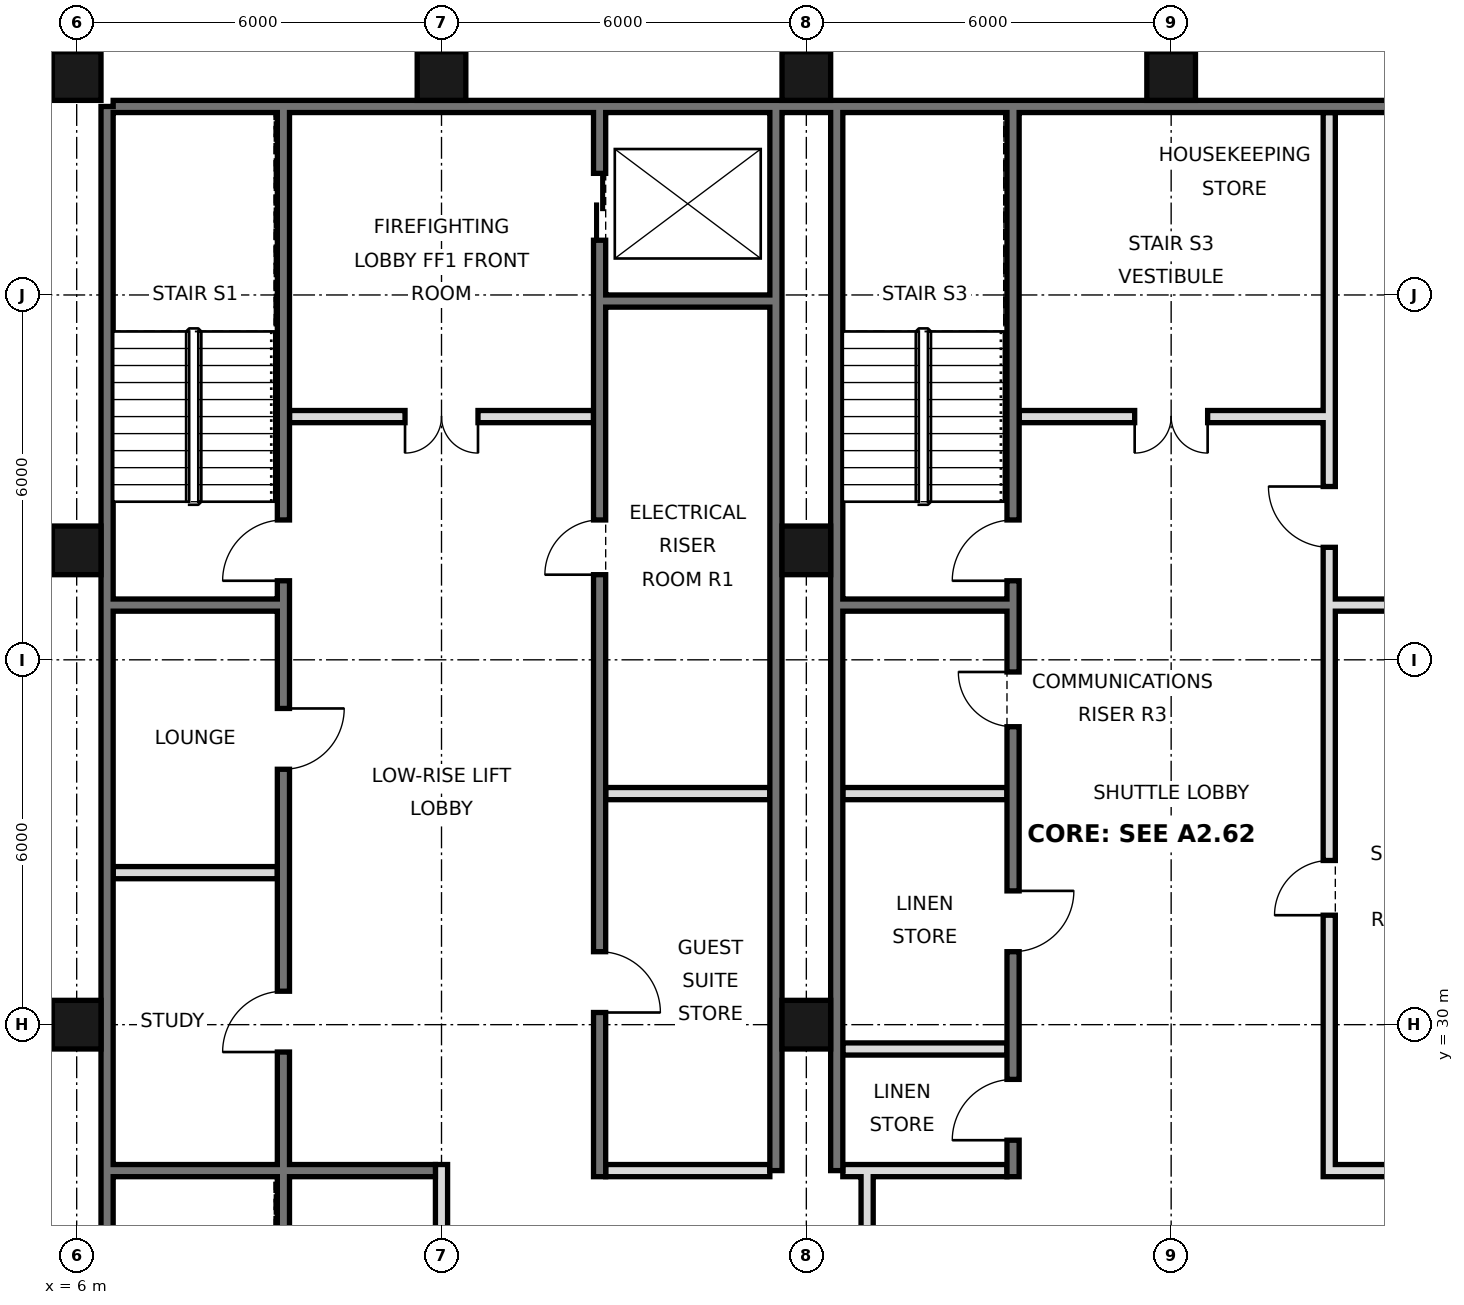
"""IFC4 building model, lengths in metres.
Left out: names, types, materials, properties, quantities, classifications, styles, units other than length and angle.
Written with IfcOpenShell. Run it as: python <this file> out.ifc"""

import sys

from ifc_helpers import new_model, si_unit, direction, frame, frame_2d, origin, origin_2d, place, context, subcontext, project, spatial, rectangle, hollow_rectangle, extrude, element, fill, save


model = new_model("IFC4")
c1 = context("Model", 3, precision=1e-05, world=origin(), true_north=direction((0.0, 1.0)))
c2 = subcontext(c1, "Body", "Model", "MODEL_VIEW")
j1 = project(units=[si_unit("LENGTHUNIT", "METRE"), si_unit("PLANEANGLEUNIT", "RADIAN")], contexts=[c1])
p1 = place(None, origin())
s1 = spatial("IfcSite", under=j1, at=p1, CompositionType="ELEMENT")
p2 = place(p1, origin())
s2 = spatial("IfcBuilding", under=s1, at=p2, CompositionType="ELEMENT")
p3 = place(p2, frame((0.0, 0.0, 246.8)))
s3 = spatial("IfcBuildingStorey", under=s2, at=p3, CompositionType="ELEMENT", Elevation=246.8)
for number, where, z_axis, x_axis in (
    (1, (6.0, 30.0, 0.0), (0.0, 0.0, 1.0), (1.0, 0.0, 0.0)),
    (2, (6.0, 37.8, 0.0), (0.0, 0.0, 1.0), (1.0, 0.0, 0.0)),
    (3, (6.0, 45.6, 0.0), (0.0, 0.0, 1.0), (1.0, 0.0, 0.0)),
    (4, (12.0, 45.6, 0.0), (0.0, 0.0, 1.0), (1.0, 0.0, 0.0)),
    (5, (18.0, 30.0, 0.0), (0.0, 0.0, 1.0), (1.0, 0.0, 0.0)),
    (6, (18.0, 37.8, 0.0), (0.0, 0.0, 1.0), (1.0, 0.0, 0.0)),
    (7, (18.0, 45.6, 0.0), (0.0, 0.0, 1.0), (1.0, 0.0, 0.0)),
    (8, (24.0, 45.6, 0.0), (0.0, 0.0, 1.0), (1.0, 0.0, 0.0)),
):
    element("IfcColumn", number, at=place(p3, frame(where, z_axis=z_axis, x_axis=x_axis)), inside=s3, PredefinedType="COLUMN", context=c2, shape_type="SweptSolid", body=[
        extrude(hollow_rectangle(XDim=0.8, YDim=0.8, WallThickness=0.032, at=origin_2d()), origin(), (0.0, 0.0, 1.0), 3.6),
    ])
p4 = place(p3, frame((6.5, 21.6, 0.0), z_axis=(0.0, 0.0, 1.0), x_axis=(0.0, 1.0, 0.0)))
e9 = element("IfcWall", 9, at=p4, inside=s3, PredefinedType="SOLIDWALL", context=c2, shape_type="SweptSolid", body=[
    extrude(rectangle(XDim=23.5, YDim=0.2, at=frame_2d((11.75, 0.0))), origin(), (0.0, 0.0, 1.0), 3.42),
])
p5 = place(p3, frame((6.6, 45.1, 0.0), z_axis=(0.0, 0.0, 1.0), x_axis=(1.0, 0.0, 0.0)))
e10 = element("IfcWall", 10, at=p5, inside=s3, PredefinedType="SOLIDWALL", context=c2, shape_type="SweptSolid", body=[
    extrude(rectangle(XDim=34.8, YDim=0.2, at=frame_2d((17.4, 0.0))), origin(), (0.0, 0.0, 1.0), 3.42),
])
for number, where, z_axis, x_axis in (
    (11, (17.5, 27.6, 0.0), (0.0, 0.0, 1.0), (0.0, 1.0, 0.0)),
    (12, (18.5, 27.6, 0.0), (0.0, 0.0, 1.0), (0.0, 1.0, 0.0)),
):
    element("IfcWall", number, at=place(p3, frame(where, z_axis=z_axis, x_axis=x_axis)), inside=s3, PredefinedType="SOLIDWALL", context=c2, shape_type="SweptSolid", body=[
        extrude(rectangle(XDim=17.5, YDim=0.2, at=frame_2d((8.75, 0.0))), origin(), (0.0, 0.0, 1.0), 3.42),
    ])
p6 = place(p3, frame((19.0, 21.6, 0.0), z_axis=(0.0, 0.0, 1.0), x_axis=(0.0, 1.0, 0.0)))
e13 = element("IfcWall", 13, at=p6, inside=s3, PredefinedType="PARTITIONING", context=c2, shape_type="SweptSolid", body=[
    extrude(rectangle(XDim=6.0, YDim=0.2, at=frame_2d((3.0, 0.0))), origin(), (0.0, 0.0, 1.0), 3.42),
])
p7 = place(p6, frame((2.1, 0.0, 0.0)))
e14 = element("IfcOpeningElement", 14, at=p7, cuts=e13, PredefinedType="OPENING", context=c2, shape_type="SweptSolid", body=[
    extrude(rectangle(XDim=1.8, YDim=2.1, at=frame_2d((0.9, 1.05))), frame((0.0, 0.11, 0.0), z_axis=(0.0, -1.0, 0.0), x_axis=(1.0, 0.0, 0.0)), (0.0, 0.0, 1.0), 0.22),
])
p8 = place(p3, frame((12.0, 21.6, 0.0), z_axis=(0.0, 0.0, 1.0), x_axis=(0.0, 1.0, 0.0)))
e15 = element("IfcWall", 15, at=p8, inside=s3, PredefinedType="PARTITIONING", context=c2, shape_type="SweptSolid", body=[
    extrude(rectangle(XDim=6.1, YDim=0.2, at=frame_2d((3.05, 0.0))), origin(), (0.0, 0.0, 1.0), 3.42),
])
p9 = place(p3, frame((14.6, 27.5, 0.0), z_axis=(0.0, 0.0, 1.0), x_axis=(0.0, 1.0, 0.0)))
e16 = element("IfcWall", 16, at=p9, inside=s3, PredefinedType="SOLIDWALL", context=c2, shape_type="SweptSolid", body=[
    extrude(rectangle(XDim=17.5, YDim=0.2, at=frame_2d((8.75, 0.0))), origin(), (0.0, 0.0, 1.0), 3.42),
])
p10 = place(p9, frame((15.4, 0.0, 0.0)))
e17 = element("IfcOpeningElement", 17, at=p10, cuts=e16, PredefinedType="OPENING", context=c2, shape_type="SweptSolid", body=[
    extrude(rectangle(XDim=1.1, YDim=2.1, at=frame_2d((0.55, 1.05))), frame((0.0, 0.11, 0.0), z_axis=(0.0, -1.0, 0.0), x_axis=(1.0, 0.0, 0.0)), (0.0, 0.0, 1.0), 0.22),
])
p11 = place(p9, frame((2.7, 0.0, 0.0)))
e18 = element("IfcOpeningElement", 18, at=p11, cuts=e16, PredefinedType="OPENING", context=c2, shape_type="SweptSolid", body=[
    extrude(rectangle(XDim=1.0, YDim=2.1, at=frame_2d((0.5, 1.05))), frame((0.0, 0.11, 0.0), z_axis=(0.0, -1.0, 0.0), x_axis=(1.0, 0.0, 0.0)), (0.0, 0.0, 1.0), 0.22),
])
p12 = place(p9, frame((9.9, 0.0, 0.0)))
e19 = element("IfcOpeningElement", 19, at=p12, cuts=e16, PredefinedType="OPENING", context=c2, shape_type="SweptSolid", body=[
    extrude(rectangle(XDim=0.9, YDim=2.1, at=frame_2d((0.45, 1.05))), frame((0.0, 0.11, 0.0), z_axis=(0.0, -1.0, 0.0), x_axis=(1.0, 0.0, 0.0)), (0.0, 0.0, 1.0), 0.22),
])
p13 = place(p3, frame((21.4, 27.5, 0.0), z_axis=(0.0, 0.0, 1.0), x_axis=(0.0, 1.0, 0.0)))
e20 = element("IfcWall", 20, at=p13, inside=s3, PredefinedType="SOLIDWALL", context=c2, shape_type="SweptSolid", body=[
    extrude(rectangle(XDim=17.5, YDim=0.2, at=frame_2d((8.75, 0.0))), origin(), (0.0, 0.0, 1.0), 3.42),
])
p14 = place(p13, frame((0.6, 0.0, 0.0)))
e21 = element("IfcOpeningElement", 21, at=p14, cuts=e20, PredefinedType="OPENING", context=c2, shape_type="SweptSolid", body=[
    extrude(rectangle(XDim=1.0, YDim=2.1, at=frame_2d((0.5, 1.05))), frame((0.0, 0.11, 0.0), z_axis=(0.0, -1.0, 0.0), x_axis=(1.0, 0.0, 0.0)), (0.0, 0.0, 1.0), 0.22),
])
p15 = place(p13, frame((3.7, 0.0, 0.0)))
e22 = element("IfcOpeningElement", 22, at=p15, cuts=e20, PredefinedType="OPENING", context=c2, shape_type="SweptSolid", body=[
    extrude(rectangle(XDim=1.0, YDim=2.1, at=frame_2d((0.5, 1.05))), frame((0.0, 0.11, 0.0), z_axis=(0.0, -1.0, 0.0), x_axis=(1.0, 0.0, 0.0)), (0.0, 0.0, 1.0), 0.22),
])
p16 = place(p13, frame((9.8, 0.0, 0.0)))
e23 = element("IfcOpeningElement", 23, at=p16, cuts=e20, PredefinedType="OPENING", context=c2, shape_type="SweptSolid", body=[
    extrude(rectangle(XDim=1.0, YDim=2.1, at=frame_2d((0.5, 1.05))), frame((0.0, 0.11, 0.0), z_axis=(0.0, -1.0, 0.0), x_axis=(1.0, 0.0, 0.0)), (0.0, 0.0, 1.0), 0.22),
])
p17 = place(p13, frame((7.4, 0.0, 0.0)))
e24 = element("IfcOpeningElement", 24, at=p17, cuts=e20, PredefinedType="OPENING", context=c2, shape_type="SweptSolid", body=[
    extrude(rectangle(XDim=0.9, YDim=2.1, at=frame_2d((0.45, 1.05))), frame((0.0, 0.11, 0.0), z_axis=(0.0, -1.0, 0.0), x_axis=(1.0, 0.0, 0.0)), (0.0, 0.0, 1.0), 0.22),
])
p18 = place(p3, frame((26.6, 27.5, 0.0), z_axis=(0.0, 0.0, 1.0), x_axis=(0.0, 1.0, 0.0)))
e25 = element("IfcWall", 25, at=p18, inside=s3, PredefinedType="SOLIDWALL", context=c2, shape_type="SweptSolid", body=[
    extrude(rectangle(XDim=17.5, YDim=0.2, at=frame_2d((8.75, 0.0))), origin(), (0.0, 0.0, 1.0), 3.42),
])
p19 = place(p18, frame((4.3, 0.0, 0.0)))
e26 = element("IfcOpeningElement", 26, at=p19, cuts=e25, PredefinedType="OPENING", context=c2, shape_type="SweptSolid", body=[
    extrude(rectangle(XDim=0.9, YDim=2.1, at=frame_2d((0.45, 1.05))), frame((0.0, 0.11, 0.0), z_axis=(0.0, -1.0, 0.0), x_axis=(1.0, 0.0, 0.0)), (0.0, 0.0, 1.0), 0.22),
])
p20 = place(p18, frame((10.35, 0.0, 0.0)))
e27 = element("IfcOpeningElement", 27, at=p20, cuts=e25, PredefinedType="OPENING", context=c2, shape_type="SweptSolid", body=[
    extrude(rectangle(XDim=1.0, YDim=2.1, at=frame_2d((0.5, 1.05))), frame((0.0, 0.11, 0.0), z_axis=(0.0, -1.0, 0.0), x_axis=(1.0, 0.0, 0.0)), (0.0, 0.0, 1.0), 0.22),
])
p21 = place(p3, frame((9.4, 21.6, 0.0), z_axis=(0.0, 0.0, 1.0), x_axis=(0.0, 1.0, 0.0)))
e28 = element("IfcWall", 28, at=p21, inside=s3, PredefinedType="SOLIDWALL", context=c2, shape_type="SweptSolid", body=[
    extrude(rectangle(XDim=23.4, YDim=0.2, at=frame_2d((11.7, 0.0))), origin(), (0.0, 0.0, 1.0), 3.42),
])
p22 = place(p21, frame((7.95, 0.0, 0.0)))
e29 = element("IfcOpeningElement", 29, at=p22, cuts=e28, PredefinedType="OPENING", context=c2, shape_type="SweptSolid", body=[
    extrude(rectangle(XDim=1.0, YDim=2.1, at=frame_2d((0.5, 1.05))), frame((0.0, 0.11, 0.0), z_axis=(0.0, -1.0, 0.0), x_axis=(1.0, 0.0, 0.0)), (0.0, 0.0, 1.0), 0.22),
])
p23 = place(p21, frame((12.6, 0.0, 0.0)))
e30 = element("IfcOpeningElement", 30, at=p23, cuts=e28, PredefinedType="OPENING", context=c2, shape_type="SweptSolid", body=[
    extrude(rectangle(XDim=1.0, YDim=2.1, at=frame_2d((0.5, 1.05))), frame((0.0, 0.11, 0.0), z_axis=(0.0, -1.0, 0.0), x_axis=(1.0, 0.0, 0.0)), (0.0, 0.0, 1.0), 0.22),
])
p24 = place(p21, frame((15.7, 0.0, 0.0)))
e31 = element("IfcOpeningElement", 31, at=p24, cuts=e28, PredefinedType="OPENING", context=c2, shape_type="SweptSolid", body=[
    extrude(rectangle(XDim=1.0, YDim=2.1, at=frame_2d((0.5, 1.05))), frame((0.0, 0.11, 0.0), z_axis=(0.0, -1.0, 0.0), x_axis=(1.0, 0.0, 0.0)), (0.0, 0.0, 1.0), 0.22),
])
p25 = place(p21, frame((0.175, 0.0, 0.0)))
e32 = element("IfcOpeningElement", 32, at=p25, cuts=e28, PredefinedType="OPENING", context=c2, shape_type="SweptSolid", body=[
    extrude(rectangle(XDim=0.9, YDim=2.1, at=frame_2d((0.45, 1.05))), frame((0.0, 0.11, 0.0), z_axis=(0.0, -1.0, 0.0), x_axis=(1.0, 0.0, 0.0)), (0.0, 0.0, 1.0), 0.22),
])
for number, where, z_axis, x_axis in (
    (33, (14.7, 27.6, 0.0), (0.0, 0.0, 1.0), (1.0, 0.0, 0.0)),
    (34, (18.6, 27.6, 0.0), (0.0, 0.0, 1.0), (1.0, 0.0, 0.0)),
):
    element("IfcWall", number, at=place(p3, frame(where, z_axis=z_axis, x_axis=x_axis)), inside=s3, PredefinedType="PARTITIONING", context=c2, shape_type="SweptSolid", body=[
        extrude(rectangle(XDim=2.7, YDim=0.2, at=frame_2d((1.35, 0.0))), origin(), (0.0, 0.0, 1.0), 3.42),
    ])
p26 = place(p3, frame((26.7, 27.6, 0.0), z_axis=(0.0, 0.0, 1.0), x_axis=(1.0, 0.0, 0.0)))
e35 = element("IfcWall", 35, at=p26, inside=s3, PredefinedType="SOLIDWALL", context=c2, shape_type="SweptSolid", body=[
    extrude(rectangle(XDim=2.7, YDim=0.2, at=frame_2d((1.35, 0.0))), origin(), (0.0, 0.0, 1.0), 3.42),
])
p27 = place(p3, frame((6.6, 27.6, 0.0), z_axis=(0.0, 0.0, 1.0), x_axis=(1.0, 0.0, 0.0)))
e36 = element("IfcWall", 36, at=p27, inside=s3, PredefinedType="SOLIDWALL", context=c2, shape_type="SweptSolid", body=[
    extrude(rectangle(XDim=5.3, YDim=0.2, at=frame_2d((2.65, 0.0))), origin(), (0.0, 0.0, 1.0), 3.42),
])
for number, where, z_axis, x_axis in (
    (37, (18.6, 29.6, 0.0), (0.0, 0.0, 1.0), (1.0, 0.0, 0.0)),
    (38, (6.6, 32.5, 0.0), (0.0, 0.0, 1.0), (1.0, 0.0, 0.0)),
):
    element("IfcWall", number, at=place(p3, frame(where, z_axis=z_axis, x_axis=x_axis)), inside=s3, PredefinedType="PARTITIONING", context=c2, shape_type="SweptSolid", body=[
        extrude(rectangle(XDim=2.7, YDim=0.2, at=frame_2d((1.35, 0.0))), origin(), (0.0, 0.0, 1.0), 3.42),
    ])
for number, where, z_axis, x_axis in (
    (39, (14.7, 33.8, 0.0), (0.0, 0.0, 1.0), (1.0, 0.0, 0.0)),
    (40, (18.6, 33.8, 0.0), (0.0, 0.0, 1.0), (1.0, 0.0, 0.0)),
    (41, (18.6, 36.9, 0.0), (0.0, 0.0, 1.0), (1.0, 0.0, 0.0)),
    (42, (26.7, 36.9, 0.0), (0.0, 0.0, 1.0), (1.0, 0.0, 0.0)),
    (43, (6.6, 36.9, 0.0), (0.0, 0.0, 1.0), (1.0, 0.0, 0.0)),
):
    element("IfcWall", number, at=place(p3, frame(where, z_axis=z_axis, x_axis=x_axis)), inside=s3, PredefinedType="SOLIDWALL", context=c2, shape_type="SweptSolid", body=[
        extrude(rectangle(XDim=2.7, YDim=0.2, at=frame_2d((1.35, 0.0))), origin(), (0.0, 0.0, 1.0), 3.42),
    ])
p28 = place(p3, frame((21.5, 40.0, 0.0), z_axis=(0.0, 0.0, 1.0), x_axis=(1.0, 0.0, 0.0)))
e44 = element("IfcWall", 44, at=p28, inside=s3, PredefinedType="PARTITIONING", context=c2, shape_type="SweptSolid", body=[
    extrude(rectangle(XDim=5.0, YDim=0.2, at=frame_2d((2.5, 0.0))), origin(), (0.0, 0.0, 1.0), 3.42),
])
p29 = place(p28, frame((1.9, 0.0, 0.0)))
e45 = element("IfcOpeningElement", 45, at=p29, cuts=e44, PredefinedType="OPENING", context=c2, shape_type="SweptSolid", body=[
    extrude(rectangle(XDim=1.2, YDim=2.1, at=frame_2d((0.6, 1.05))), frame((0.0, 0.11, 0.0), z_axis=(0.0, -1.0, 0.0), x_axis=(1.0, 0.0, 0.0)), (0.0, 0.0, 1.0), 0.22),
])
p30 = place(p3, frame((9.5, 40.0, 0.0), z_axis=(0.0, 0.0, 1.0), x_axis=(1.0, 0.0, 0.0)))
e46 = element("IfcWall", 46, at=p30, inside=s3, PredefinedType="PARTITIONING", context=c2, shape_type="SweptSolid", body=[
    extrude(rectangle(XDim=5.0, YDim=0.2, at=frame_2d((2.5, 0.0))), origin(), (0.0, 0.0, 1.0), 3.42),
])
p31 = place(p30, frame((1.9, 0.0, 0.0)))
e47 = element("IfcOpeningElement", 47, at=p31, cuts=e46, PredefinedType="OPENING", context=c2, shape_type="SweptSolid", body=[
    extrude(rectangle(XDim=1.2, YDim=2.1, at=frame_2d((0.6, 1.05))), frame((0.0, 0.11, 0.0), z_axis=(0.0, -1.0, 0.0), x_axis=(1.0, 0.0, 0.0)), (0.0, 0.0, 1.0), 0.22),
])
p32 = place(p3, frame((14.7, 41.9, 0.0), z_axis=(0.0, 0.0, 1.0), x_axis=(1.0, 0.0, 0.0)))
e48 = element("IfcWall", 48, at=p32, inside=s3, PredefinedType="SOLIDWALL", context=c2, shape_type="SweptSolid", body=[
    extrude(rectangle(XDim=2.7, YDim=0.2, at=frame_2d((1.35, 0.0))), origin(), (0.0, 0.0, 1.0), 3.42),
])
p33 = place(p31, frame((1.2, 0.0, 0.0), z_axis=(0.0, 0.0, 1.0), x_axis=(-1.0, 0.0, 0.0)))
e49 = element("IfcDoor", 49, at=p33, inside=s3, OperationType="DOUBLE_DOOR_SINGLE_SWING", PredefinedType="DOOR", context=c2, shape_type="SweptSolid", body=[
    extrude(rectangle(XDim=1.2, YDim=2.1, at=frame_2d((0.6, 1.05))), frame((0.0, 0.025, 0.0), z_axis=(0.0, -1.0, 0.0), x_axis=(1.0, 0.0, 0.0)), (0.0, 0.0, 1.0), 0.05),
])
fill(e47, e49)
p34 = place(p29, frame((1.2, 0.0, 0.0), z_axis=(0.0, 0.0, 1.0), x_axis=(-1.0, 0.0, 0.0)))
e50 = element("IfcDoor", 50, at=p34, inside=s3, OperationType="DOUBLE_DOOR_SINGLE_SWING", PredefinedType="DOOR", context=c2, shape_type="SweptSolid", body=[
    extrude(rectangle(XDim=1.2, YDim=2.1, at=frame_2d((0.6, 1.05))), frame((0.0, 0.025, 0.0), z_axis=(0.0, -1.0, 0.0), x_axis=(1.0, 0.0, 0.0)), (0.0, 0.0, 1.0), 0.05),
])
fill(e45, e50)
p35 = place(p10, origin())
e51 = element("IfcDoor", 51, at=p35, inside=s3, OperationType="DOUBLE_DOOR_SLIDING", PredefinedType="DOOR", context=c2, shape_type="SweptSolid", body=[
    extrude(rectangle(XDim=1.1, YDim=2.1, at=frame_2d((0.55, 1.05))), frame((0.0, 0.025, 0.0), z_axis=(0.0, -1.0, 0.0), x_axis=(1.0, 0.0, 0.0)), (0.0, 0.0, 1.0), 0.05),
])
fill(e17, e51)
p36 = place(p14, origin())
e52 = element("IfcDoor", 52, at=p36, inside=s3, OperationType="SINGLE_SWING_LEFT", PredefinedType="DOOR", context=c2, shape_type="SweptSolid", body=[
    extrude(rectangle(XDim=1.0, YDim=2.1, at=frame_2d((0.5, 1.05))), frame((0.0, 0.025, 0.0), z_axis=(0.0, -1.0, 0.0), x_axis=(1.0, 0.0, 0.0)), (0.0, 0.0, 1.0), 0.05),
])
fill(e21, e52)
p37 = place(p15, origin())
e53 = element("IfcDoor", 53, at=p37, inside=s3, OperationType="SINGLE_SWING_RIGHT", PredefinedType="DOOR", context=c2, shape_type="SweptSolid", body=[
    extrude(rectangle(XDim=1.0, YDim=2.1, at=frame_2d((0.5, 1.05))), frame((0.0, 0.025, 0.0), z_axis=(0.0, -1.0, 0.0), x_axis=(1.0, 0.0, 0.0)), (0.0, 0.0, 1.0), 0.05),
])
fill(e22, e53)
p38 = place(p11, frame((1.0, 0.0, 0.0), z_axis=(0.0, 0.0, 1.0), x_axis=(-1.0, 0.0, 0.0)))
e54 = element("IfcDoor", 54, at=p38, inside=s3, OperationType="SINGLE_SWING_RIGHT", PredefinedType="DOOR", context=c2, shape_type="SweptSolid", body=[
    extrude(rectangle(XDim=1.0, YDim=2.1, at=frame_2d((0.5, 1.05))), frame((0.0, 0.025, 0.0), z_axis=(0.0, -1.0, 0.0), x_axis=(1.0, 0.0, 0.0)), (0.0, 0.0, 1.0), 0.05),
])
fill(e18, e54)
p39 = place(p22, origin())
e55 = element("IfcDoor", 55, at=p39, inside=s3, OperationType="SINGLE_SWING_LEFT", PredefinedType="DOOR", context=c2, shape_type="SweptSolid", body=[
    extrude(rectangle(XDim=1.0, YDim=2.1, at=frame_2d((0.5, 1.05))), frame((0.0, 0.025, 0.0), z_axis=(0.0, -1.0, 0.0), x_axis=(1.0, 0.0, 0.0)), (0.0, 0.0, 1.0), 0.05),
])
fill(e29, e55)
p40 = place(p23, origin())
e56 = element("IfcDoor", 56, at=p40, inside=s3, OperationType="SINGLE_SWING_RIGHT", PredefinedType="DOOR", context=c2, shape_type="SweptSolid", body=[
    extrude(rectangle(XDim=1.0, YDim=2.1, at=frame_2d((0.5, 1.05))), frame((0.0, 0.025, 0.0), z_axis=(0.0, -1.0, 0.0), x_axis=(1.0, 0.0, 0.0)), (0.0, 0.0, 1.0), 0.05),
])
fill(e30, e56)
p41 = place(p24, origin())
e57 = element("IfcDoor", 57, at=p41, inside=s3, OperationType="SINGLE_SWING_LEFT", PredefinedType="DOOR", context=c2, shape_type="SweptSolid", body=[
    extrude(rectangle(XDim=1.0, YDim=2.1, at=frame_2d((0.5, 1.05))), frame((0.0, 0.025, 0.0), z_axis=(0.0, -1.0, 0.0), x_axis=(1.0, 0.0, 0.0)), (0.0, 0.0, 1.0), 0.05),
])
fill(e31, e57)
p42 = place(p16, origin())
e58 = element("IfcDoor", 58, at=p42, inside=s3, OperationType="SINGLE_SWING_LEFT", PredefinedType="DOOR", context=c2, shape_type="SweptSolid", body=[
    extrude(rectangle(XDim=1.0, YDim=2.1, at=frame_2d((0.5, 1.05))), frame((0.0, 0.025, 0.0), z_axis=(0.0, -1.0, 0.0), x_axis=(1.0, 0.0, 0.0)), (0.0, 0.0, 1.0), 0.05),
])
fill(e23, e58)
p43 = place(p12, origin())
e59 = element("IfcDoor", 59, at=p43, inside=s3, OperationType="SINGLE_SWING_LEFT", PredefinedType="DOOR", context=c2, shape_type="SweptSolid", body=[
    extrude(rectangle(XDim=0.9, YDim=2.1, at=frame_2d((0.45, 1.05))), frame((0.0, 0.025, 0.0), z_axis=(0.0, -1.0, 0.0), x_axis=(1.0, 0.0, 0.0)), (0.0, 0.0, 1.0), 0.05),
])
fill(e19, e59)
p44 = place(p17, frame((0.9, 0.0, 0.0), z_axis=(0.0, 0.0, 1.0), x_axis=(-1.0, 0.0, 0.0)))
e60 = element("IfcDoor", 60, at=p44, inside=s3, OperationType="SINGLE_SWING_LEFT", PredefinedType="DOOR", context=c2, shape_type="SweptSolid", body=[
    extrude(rectangle(XDim=0.9, YDim=2.1, at=frame_2d((0.45, 1.05))), frame((0.0, 0.025, 0.0), z_axis=(0.0, -1.0, 0.0), x_axis=(1.0, 0.0, 0.0)), (0.0, 0.0, 1.0), 0.05),
])
fill(e24, e60)
p45 = place(p19, origin())
e61 = element("IfcDoor", 61, at=p45, inside=s3, OperationType="SINGLE_SWING_LEFT", PredefinedType="DOOR", context=c2, shape_type="SweptSolid", body=[
    extrude(rectangle(XDim=0.9, YDim=2.1, at=frame_2d((0.45, 1.05))), frame((0.0, 0.025, 0.0), z_axis=(0.0, -1.0, 0.0), x_axis=(1.0, 0.0, 0.0)), (0.0, 0.0, 1.0), 0.05),
])
fill(e26, e61)
p46 = place(p20, frame((1.0, 0.0, 0.0), z_axis=(0.0, 0.0, 1.0), x_axis=(-1.0, 0.0, 0.0)))
e62 = element("IfcDoor", 62, at=p46, inside=s3, OperationType="SINGLE_SWING_LEFT", PredefinedType="DOOR", context=c2, shape_type="SweptSolid", body=[
    extrude(rectangle(XDim=1.0, YDim=2.1, at=frame_2d((0.5, 1.05))), frame((0.0, 0.025, 0.0), z_axis=(0.0, -1.0, 0.0), x_axis=(1.0, 0.0, 0.0)), (0.0, 0.0, 1.0), 0.05),
])
fill(e27, e62)
save(model, sys.argv[1])
